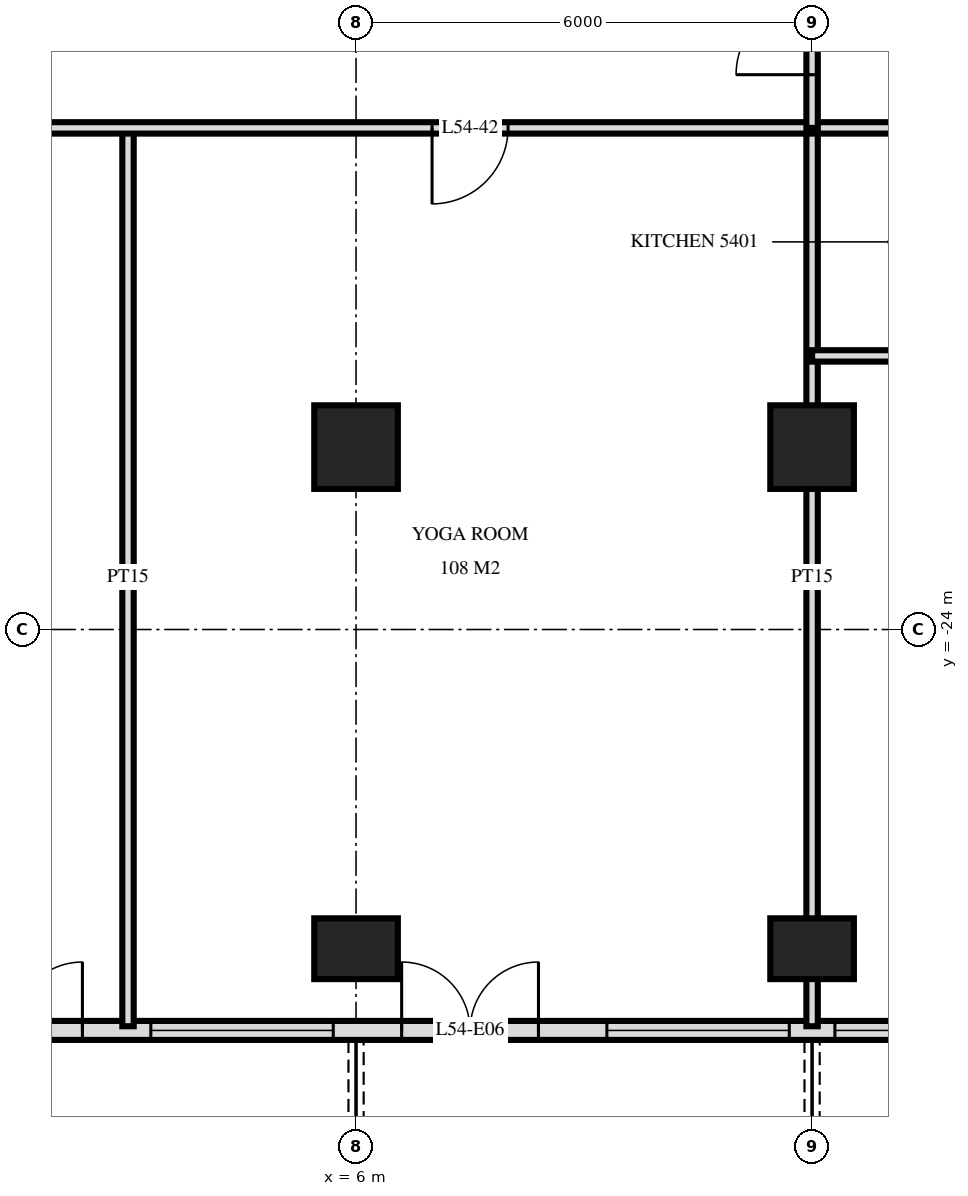
"""IFC4 building model, lengths in metres.
Left out: names, types, materials, properties, quantities, classifications, styles, units other than length and angle.
Written with IfcOpenShell. Run it as: python <this file> out.ifc"""

import sys

from ifc_helpers import new_model, si_unit, direction, frame, frame_2d, origin, origin_2d, place, context, subcontext, project, spatial, rectangle, extrude, element, fill, save


model = new_model("IFC4")
c1 = context("Model", 3, precision=1e-05, world=origin(), true_north=direction((0.0, 1.0)))
c2 = subcontext(c1, "Body", "Model", "MODEL_VIEW")
j1 = project(units=[si_unit("LENGTHUNIT", "METRE"), si_unit("PLANEANGLEUNIT", "RADIAN")], contexts=[c1])
p1 = place(None, origin())
s1 = spatial("IfcSite", under=j1, at=p1, CompositionType="ELEMENT")
p2 = place(p1, origin())
s2 = spatial("IfcBuilding", under=s1, at=p2, CompositionType="ELEMENT")
p3 = place(p2, frame((0.0, 0.0, 208.1)))
s3 = spatial("IfcBuildingStorey", under=s2, at=p3, CompositionType="ELEMENT", Elevation=208.1)
p4 = place(p3, frame((6.0, -28.2, 0.0), z_axis=(0.0, 0.0, 1.0), x_axis=(1.0, 0.0, 0.0)))
e1 = element("IfcColumn", 1, at=p4, inside=s3, PredefinedType="COLUMN", context=c2, shape_type="SweptSolid", body=[
    extrude(rectangle(XDim=1.1, YDim=0.8, at=origin_2d()), origin(), (0.0, 0.0, 1.0), 3.5),
])
p5 = place(p3, frame((6.0, -21.6, 0.0), z_axis=(0.0, 0.0, 1.0), x_axis=(1.0, 0.0, 0.0)))
e2 = element("IfcColumn", 2, at=p5, inside=s3, PredefinedType="COLUMN", context=c2, shape_type="SweptSolid", body=[
    extrude(rectangle(XDim=1.1, YDim=1.1, at=origin_2d()), origin(), (0.0, 0.0, 1.0), 3.5),
])
p6 = place(p3, frame((12.0, -28.2, 0.0), z_axis=(0.0, 0.0, 1.0), x_axis=(1.0, 0.0, 0.0)))
e3 = element("IfcColumn", 3, at=p6, inside=s3, PredefinedType="COLUMN", context=c2, shape_type="SweptSolid", body=[
    extrude(rectangle(XDim=1.1, YDim=0.8, at=origin_2d()), origin(), (0.0, 0.0, 1.0), 3.5),
])
p7 = place(p3, frame((12.0, -21.6, 0.0), z_axis=(0.0, 0.0, 1.0), x_axis=(1.0, 0.0, 0.0)))
e4 = element("IfcColumn", 4, at=p7, inside=s3, PredefinedType="COLUMN", context=c2, shape_type="SweptSolid", body=[
    extrude(rectangle(XDim=1.1, YDim=1.1, at=origin_2d()), origin(), (0.0, 0.0, 1.0), 3.5),
])
p8 = place(p3, frame((-22.475, -29.275, 0.0), z_axis=(0.0, 0.0, 1.0), x_axis=(1.0, 0.0, 0.0)))
e5 = element("IfcWall", 5, at=p8, inside=s3, PredefinedType="SOLIDWALL", context=c2, shape_type="SweptSolid", body=[
    extrude(rectangle(XDim=44.951, YDim=0.25, at=frame_2d((22.475, 0.0))), origin(), (0.0, 0.0, 1.0), 3.22),
])
p9 = place(p8, frame((0.575, 0.0, 0.0)))
e6 = element("IfcOpeningElement", 6, at=p9, cuts=e5, PredefinedType="OPENING", context=c2, shape_type="SweptSolid", body=[
    extrude(rectangle(XDim=1.8, YDim=2.4, at=frame_2d((0.9, 1.2))), frame((0.0, 0.135, 0.0), z_axis=(0.0, -1.0, 0.0), x_axis=(1.0, 0.0, 0.0)), (0.0, 0.0, 1.0), 0.27),
])
p10 = place(p8, frame((6.2, 0.0, 0.0)))
e7 = element("IfcOpeningElement", 7, at=p10, cuts=e5, PredefinedType="OPENING", context=c2, shape_type="SweptSolid", body=[
    extrude(rectangle(XDim=1.8, YDim=2.4, at=frame_2d((0.9, 1.2))), frame((0.0, 0.135, 0.0), z_axis=(0.0, -1.0, 0.0), x_axis=(1.0, 0.0, 0.0)), (0.0, 0.0, 1.0), 0.27),
])
p11 = place(p8, frame((8.45, 0.0, 0.9)))
e8 = element("IfcOpeningElement", 8, at=p11, cuts=e5, PredefinedType="OPENING", context=c2, shape_type="SweptSolid", body=[
    extrude(rectangle(XDim=1.8, YDim=1.5, at=frame_2d((0.9, 0.75))), frame((0.0, 0.135, 0.0), z_axis=(0.0, -1.0, 0.0), x_axis=(1.0, 0.0, 0.0)), (0.0, 0.0, 1.0), 0.27),
])
p12 = place(p8, frame((11.075, 0.0, 0.0)))
e9 = element("IfcOpeningElement", 9, at=p12, cuts=e5, PredefinedType="OPENING", context=c2, shape_type="SweptSolid", body=[
    extrude(rectangle(XDim=1.8, YDim=2.4, at=frame_2d((0.9, 1.2))), frame((0.0, 0.135, 0.0), z_axis=(0.0, -1.0, 0.0), x_axis=(1.0, 0.0, 0.0)), (0.0, 0.0, 1.0), 0.27),
])
p13 = place(p8, frame((13.775, 0.0, 0.9)))
e10 = element("IfcOpeningElement", 10, at=p13, cuts=e5, PredefinedType="OPENING", context=c2, shape_type="SweptSolid", body=[
    extrude(rectangle(XDim=2.4, YDim=1.5, at=frame_2d((1.2, 0.75))), frame((0.0, 0.135, 0.0), z_axis=(0.0, -1.0, 0.0), x_axis=(1.0, 0.0, 0.0)), (0.0, 0.0, 1.0), 0.27),
])
p14 = place(p8, frame((16.775, 0.0, 0.9)))
e11 = element("IfcOpeningElement", 11, at=p14, cuts=e5, PredefinedType="OPENING", context=c2, shape_type="SweptSolid", body=[
    extrude(rectangle(XDim=2.4, YDim=1.5, at=frame_2d((1.2, 0.75))), frame((0.0, 0.135, 0.0), z_axis=(0.0, -1.0, 0.0), x_axis=(1.0, 0.0, 0.0)), (0.0, 0.0, 1.0), 0.27),
])
p15 = place(p8, frame((20.075, 0.0, 0.0)))
e12 = element("IfcOpeningElement", 12, at=p15, cuts=e5, PredefinedType="OPENING", context=c2, shape_type="SweptSolid", body=[
    extrude(rectangle(XDim=1.8, YDim=2.4, at=frame_2d((0.9, 1.2))), frame((0.0, 0.135, 0.0), z_axis=(0.0, -1.0, 0.0), x_axis=(1.0, 0.0, 0.0)), (0.0, 0.0, 1.0), 0.27),
])
p16 = place(p8, frame((23.075, 0.0, 0.0)))
e13 = element("IfcOpeningElement", 13, at=p16, cuts=e5, PredefinedType="OPENING", context=c2, shape_type="SweptSolid", body=[
    extrude(rectangle(XDim=1.8, YDim=2.4, at=frame_2d((0.9, 1.2))), frame((0.0, 0.135, 0.0), z_axis=(0.0, -1.0, 0.0), x_axis=(1.0, 0.0, 0.0)), (0.0, 0.0, 1.0), 0.27),
])
p17 = place(p8, frame((25.775, 0.0, 0.9)))
e14 = element("IfcOpeningElement", 14, at=p17, cuts=e5, PredefinedType="OPENING", context=c2, shape_type="SweptSolid", body=[
    extrude(rectangle(XDim=2.4, YDim=1.5, at=frame_2d((1.2, 0.75))), frame((0.0, 0.135, 0.0), z_axis=(0.0, -1.0, 0.0), x_axis=(1.0, 0.0, 0.0)), (0.0, 0.0, 1.0), 0.27),
])
p18 = place(p8, frame((29.075, 0.0, 0.0)))
e15 = element("IfcOpeningElement", 15, at=p18, cuts=e5, PredefinedType="OPENING", context=c2, shape_type="SweptSolid", body=[
    extrude(rectangle(XDim=1.8, YDim=2.4, at=frame_2d((0.9, 1.2))), frame((0.0, 0.135, 0.0), z_axis=(0.0, -1.0, 0.0), x_axis=(1.0, 0.0, 0.0)), (0.0, 0.0, 1.0), 0.27),
])
p19 = place(p8, frame((31.775, 0.0, 0.9)))
e16 = element("IfcOpeningElement", 16, at=p19, cuts=e5, PredefinedType="OPENING", context=c2, shape_type="SweptSolid", body=[
    extrude(rectangle(XDim=2.4, YDim=1.5, at=frame_2d((1.2, 0.75))), frame((0.0, 0.135, 0.0), z_axis=(0.0, -1.0, 0.0), x_axis=(1.0, 0.0, 0.0)), (0.0, 0.0, 1.0), 0.27),
])
p20 = place(p8, frame((34.775, 0.0, 0.9)))
e17 = element("IfcOpeningElement", 17, at=p20, cuts=e5, PredefinedType="OPENING", context=c2, shape_type="SweptSolid", body=[
    extrude(rectangle(XDim=2.4, YDim=1.5, at=frame_2d((1.2, 0.75))), frame((0.0, 0.135, 0.0), z_axis=(0.0, -1.0, 0.0), x_axis=(1.0, 0.0, 0.0)), (0.0, 0.0, 1.0), 0.27),
])
p21 = place(p8, frame((38.075, 0.0, 0.0)))
e18 = element("IfcOpeningElement", 18, at=p21, cuts=e5, PredefinedType="OPENING", context=c2, shape_type="SweptSolid", body=[
    extrude(rectangle(XDim=1.8, YDim=2.4, at=frame_2d((0.9, 1.2))), frame((0.0, 0.135, 0.0), z_axis=(0.0, -1.0, 0.0), x_axis=(1.0, 0.0, 0.0)), (0.0, 0.0, 1.0), 0.27),
])
p22 = place(p8, frame((41.075, 0.0, 0.0)))
e19 = element("IfcOpeningElement", 19, at=p22, cuts=e5, PredefinedType="OPENING", context=c2, shape_type="SweptSolid", body=[
    extrude(rectangle(XDim=1.8, YDim=2.4, at=frame_2d((0.9, 1.2))), frame((0.0, 0.135, 0.0), z_axis=(0.0, -1.0, 0.0), x_axis=(1.0, 0.0, 0.0)), (0.0, 0.0, 1.0), 0.27),
])
p23 = place(p3, frame((12.0, -17.4, 0.0), z_axis=(0.0, 0.0, 1.0), x_axis=(0.0, 1.0, 0.0)))
e20 = element("IfcWall", 20, at=p23, inside=s3, PredefinedType="PARTITIONING", context=c2, shape_type="SweptSolid", body=[
    extrude(rectangle(XDim=2.35, YDim=0.15, at=frame_2d((1.175, 0.0))), origin(), (0.0, 0.0, 1.0), 3.22),
])
p24 = place(p23, frame((0.7, 0.0, 0.0)))
e21 = element("IfcOpeningElement", 21, at=p24, cuts=e20, PredefinedType="OPENING", context=c2, shape_type="SweptSolid", body=[
    extrude(rectangle(XDim=1.0, YDim=2.1, at=frame_2d((0.5, 1.05))), frame((0.0, 0.085, 0.0), z_axis=(0.0, -1.0, 0.0), x_axis=(1.0, 0.0, 0.0)), (0.0, 0.0, 1.0), 0.17),
])
for number, where, z_axis, x_axis in (
    (22, (12.0, -29.22, 0.0), (0.0, 0.0, 1.0), (0.0, 1.0, 0.0)),
    (23, (3.0, -29.22, 0.0), (0.0, 0.0, 1.0), (0.0, 1.0, 0.0)),
):
    element("IfcWall", number, at=place(p3, frame(where, z_axis=z_axis, x_axis=x_axis)), inside=s3, PredefinedType="PARTITIONING", context=c2, shape_type="SweptSolid", body=[
        extrude(rectangle(XDim=11.82, YDim=0.15, at=frame_2d((5.91, 0.0))), origin(), (0.0, 0.0, 1.0), 3.22),
    ])
p25 = place(p3, frame((12.0, -20.4, 0.0), z_axis=(0.0, 0.0, 1.0), x_axis=(1.0, 0.0, 0.0)))
e24 = element("IfcWall", 24, at=p25, inside=s3, PredefinedType="PARTITIONING", context=c2, shape_type="SweptSolid", body=[
    extrude(rectangle(XDim=2.1, YDim=0.15, at=frame_2d((1.05, 0.0))), origin(), (0.0, 0.0, 1.0), 3.22),
])
p26 = place(p3, frame((-26.82, -17.4, 0.0), z_axis=(0.0, 0.0, 1.0), x_axis=(1.0, 0.0, 0.0)))
e25 = element("IfcWall", 25, at=p26, inside=s3, PredefinedType="PARTITIONING", context=c2, shape_type="SweptSolid", body=[
    extrude(rectangle(XDim=53.64, YDim=0.15, at=frame_2d((26.82, 0.0))), origin(), (0.0, 0.0, 1.0), 3.22),
])
p27 = place(p26, frame((4.92, 0.0, 0.0)))
e26 = element("IfcOpeningElement", 26, at=p27, cuts=e25, PredefinedType="OPENING", context=c2, shape_type="SweptSolid", body=[
    extrude(rectangle(XDim=1.0, YDim=2.1, at=frame_2d((0.5, 1.05))), frame((0.0, 0.085, 0.0), z_axis=(0.0, -1.0, 0.0), x_axis=(1.0, 0.0, 0.0)), (0.0, 0.0, 1.0), 0.17),
])
p28 = place(p26, frame((1.62, 0.0, 0.0)))
e27 = element("IfcOpeningElement", 27, at=p28, cuts=e25, PredefinedType="OPENING", context=c2, shape_type="SweptSolid", body=[
    extrude(rectangle(XDim=1.0, YDim=2.1, at=frame_2d((0.5, 1.05))), frame((0.0, 0.085, 0.0), z_axis=(0.0, -1.0, 0.0), x_axis=(1.0, 0.0, 0.0)), (0.0, 0.0, 1.0), 0.17),
])
p29 = place(p26, frame((41.17, 0.0, 0.0)))
e28 = element("IfcOpeningElement", 28, at=p29, cuts=e25, PredefinedType="OPENING", context=c2, shape_type="SweptSolid", body=[
    extrude(rectangle(XDim=1.0, YDim=2.1, at=frame_2d((0.5, 1.05))), frame((0.0, 0.085, 0.0), z_axis=(0.0, -1.0, 0.0), x_axis=(1.0, 0.0, 0.0)), (0.0, 0.0, 1.0), 0.17),
])
p30 = place(p26, frame((49.42, 0.0, 0.0)))
e29 = element("IfcOpeningElement", 29, at=p30, cuts=e25, PredefinedType="OPENING", context=c2, shape_type="SweptSolid", body=[
    extrude(rectangle(XDim=1.0, YDim=2.1, at=frame_2d((0.5, 1.05))), frame((0.0, 0.085, 0.0), z_axis=(0.0, -1.0, 0.0), x_axis=(1.0, 0.0, 0.0)), (0.0, 0.0, 1.0), 0.17),
])
p31 = place(p26, frame((47.62, 0.0, 0.0)))
e30 = element("IfcOpeningElement", 30, at=p31, cuts=e25, PredefinedType="OPENING", context=c2, shape_type="SweptSolid", body=[
    extrude(rectangle(XDim=1.0, YDim=2.1, at=frame_2d((0.5, 1.05))), frame((0.0, 0.085, 0.0), z_axis=(0.0, -1.0, 0.0), x_axis=(1.0, 0.0, 0.0)), (0.0, 0.0, 1.0), 0.17),
])
p32 = place(p26, frame((21.82, 0.0, 0.0)))
e31 = element("IfcOpeningElement", 31, at=p32, cuts=e25, PredefinedType="OPENING", context=c2, shape_type="SweptSolid", body=[
    extrude(rectangle(XDim=1.0, YDim=2.1, at=frame_2d((0.5, 1.05))), frame((0.0, 0.085, 0.0), z_axis=(0.0, -1.0, 0.0), x_axis=(1.0, 0.0, 0.0)), (0.0, 0.0, 1.0), 0.17),
])
p33 = place(p26, frame((33.82, 0.0, 0.0)))
e32 = element("IfcOpeningElement", 32, at=p33, cuts=e25, PredefinedType="OPENING", context=c2, shape_type="SweptSolid", body=[
    extrude(rectangle(XDim=1.0, YDim=2.1, at=frame_2d((0.5, 1.05))), frame((0.0, 0.085, 0.0), z_axis=(0.0, -1.0, 0.0), x_axis=(1.0, 0.0, 0.0)), (0.0, 0.0, 1.0), 0.17),
])
p34 = place(p16, origin())
e33 = element("IfcDoor", 33, at=p34, inside=s3, OperationType="DOUBLE_DOOR_SINGLE_SWING", PredefinedType="DOOR", context=c2, shape_type="SweptSolid", body=[
    extrude(rectangle(XDim=1.8, YDim=2.4, at=frame_2d((0.9, 1.2))), frame((0.0, 0.025, 0.0), z_axis=(0.0, -1.0, 0.0), x_axis=(1.0, 0.0, 0.0)), (0.0, 0.0, 1.0), 0.05),
])
fill(e13, e33)
p35 = place(p17, origin())
e34 = element("IfcWindow", 34, at=p35, inside=s3, PartitioningType="SINGLE_PANEL", PredefinedType="WINDOW", context=c2, shape_type="SweptSolid", body=[
    extrude(rectangle(XDim=2.4, YDim=1.5, at=frame_2d((1.2, 0.75))), frame((0.0, 0.03, 0.0), z_axis=(0.0, -1.0, 0.0), x_axis=(1.0, 0.0, 0.0)), (0.0, 0.0, 1.0), 0.06),
])
fill(e14, e34)
p36 = place(p18, origin())
e35 = element("IfcDoor", 35, at=p36, inside=s3, OperationType="DOUBLE_DOOR_SINGLE_SWING", PredefinedType="DOOR", context=c2, shape_type="SweptSolid", body=[
    extrude(rectangle(XDim=1.8, YDim=2.4, at=frame_2d((0.9, 1.2))), frame((0.0, 0.025, 0.0), z_axis=(0.0, -1.0, 0.0), x_axis=(1.0, 0.0, 0.0)), (0.0, 0.0, 1.0), 0.05),
])
fill(e15, e35)
p37 = place(p19, origin())
e36 = element("IfcWindow", 36, at=p37, inside=s3, PartitioningType="SINGLE_PANEL", PredefinedType="WINDOW", context=c2, shape_type="SweptSolid", body=[
    extrude(rectangle(XDim=2.4, YDim=1.5, at=frame_2d((1.2, 0.75))), frame((0.0, 0.03, 0.0), z_axis=(0.0, -1.0, 0.0), x_axis=(1.0, 0.0, 0.0)), (0.0, 0.0, 1.0), 0.06),
])
fill(e16, e36)
p38 = place(p20, origin())
e37 = element("IfcWindow", 37, at=p38, inside=s3, PartitioningType="SINGLE_PANEL", PredefinedType="WINDOW", context=c2, shape_type="SweptSolid", body=[
    extrude(rectangle(XDim=2.4, YDim=1.5, at=frame_2d((1.2, 0.75))), frame((0.0, 0.03, 0.0), z_axis=(0.0, -1.0, 0.0), x_axis=(1.0, 0.0, 0.0)), (0.0, 0.0, 1.0), 0.06),
])
fill(e17, e37)
p39 = place(p24, origin())
e38 = element("IfcDoor", 38, at=p39, inside=s3, OperationType="SINGLE_SWING_RIGHT", PredefinedType="DOOR", context=c2, shape_type="SweptSolid", body=[
    extrude(rectangle(XDim=1.0, YDim=2.1, at=frame_2d((0.5, 1.05))), frame((0.0, 0.025, 0.0), z_axis=(0.0, -1.0, 0.0), x_axis=(1.0, 0.0, 0.0)), (0.0, 0.0, 1.0), 0.05),
])
fill(e21, e38)
p40 = place(p33, frame((0.5, 0.0, 0.0), z_axis=(0.0, 0.0, 1.0), x_axis=(-1.0, 0.0, 0.0)))
e39 = element("IfcDoor", 39, at=p40, inside=s3, OperationType="SINGLE_SWING_LEFT", PredefinedType="DOOR", context=c2, shape_type="SweptSolid", body=[
    extrude(rectangle(XDim=1.0, YDim=2.1, at=frame_2d((0.0, 1.05))), frame((0.0, -0.025, 0.0), z_axis=(0.0, 1.0, 0.0), x_axis=(-1.0, 0.0, 0.0)), (0.0, 0.0, 1.0), 0.05),
])
fill(e32, e39)
save(model, sys.argv[1])
